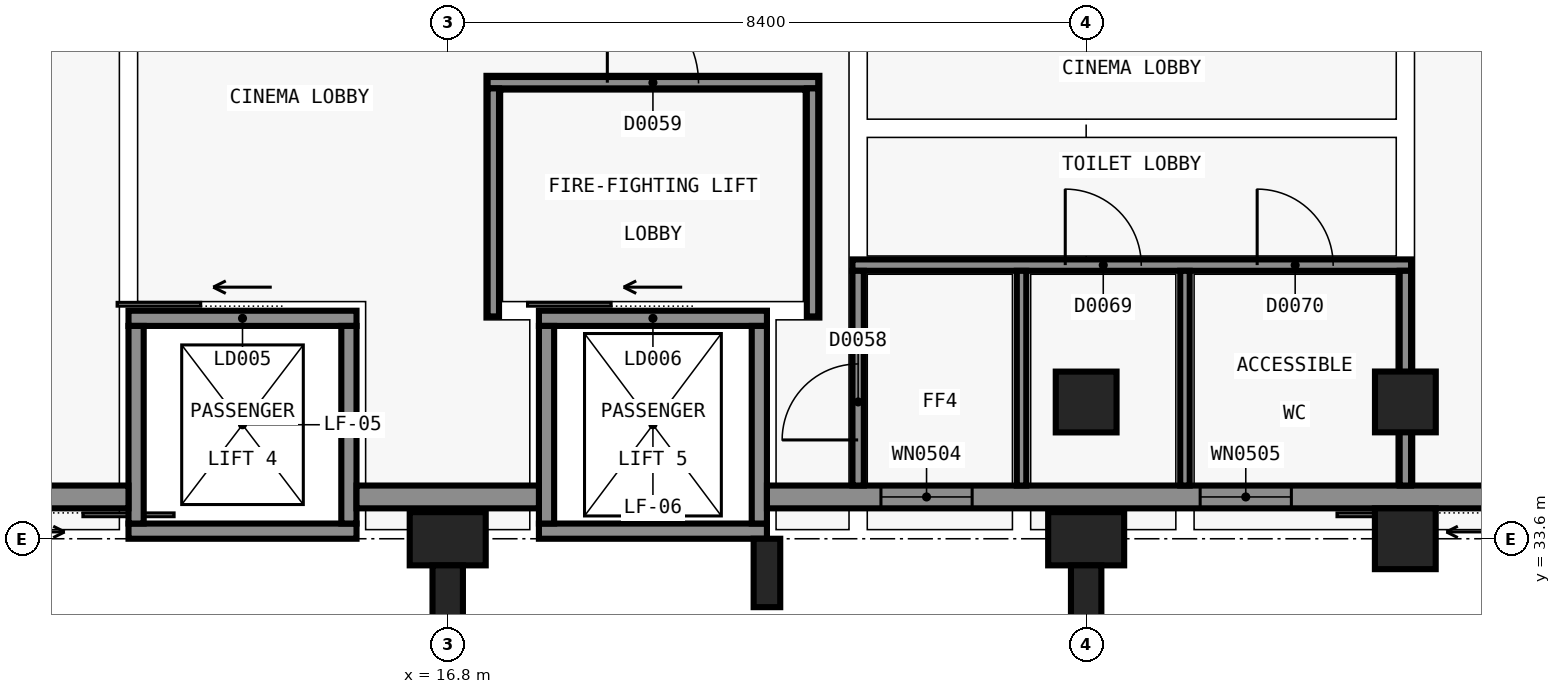
"""IFC4 building model, lengths in metres.
Left out: names, types, materials, properties, quantities, classifications, styles, units other than length and angle.
Written with IfcOpenShell. Run it as: python <this file> out.ifc"""

import sys

from ifc_helpers import new_model, si_unit, direction, frame, frame_2d, origin, origin_2d, place, context, subcontext, project, spatial, rectangle, extrude, element, fill, save


model = new_model("IFC4")
c1 = context("Model", 3, precision=1e-05, world=origin(), true_north=direction((0.0, 1.0)))
c2 = subcontext(c1, "Body", "Model", "MODEL_VIEW")
j1 = project(units=[si_unit("LENGTHUNIT", "METRE"), si_unit("PLANEANGLEUNIT", "RADIAN")], contexts=[c1])
p1 = place(None, origin())
s1 = spatial("IfcSite", under=j1, at=p1, CompositionType="ELEMENT")
p2 = place(p1, origin())
s2 = spatial("IfcBuilding", under=s1, at=p2, CompositionType="ELEMENT")
p3 = place(p2, origin())
s3 = spatial("IfcBuildingStorey", under=s2, at=p3, CompositionType="ELEMENT", Elevation=0.0)
p4 = place(p3, frame((15.6, 33.7, -1.6), z_axis=(0.0, 0.0, 1.0), x_axis=(-1.0, 0.0, 0.0)))
e1 = element("IfcWall", 1, at=p4, inside=s3, PredefinedType="SHEAR", context=c2, shape_type="SweptSolid", body=[
    extrude(rectangle(XDim=3.0, YDim=0.2, at=frame_2d((1.5, 0.0))), origin(), (0.0, 0.0, 1.0), 7.0),
])
p5 = place(p3, frame((12.6, 36.5, -1.6), z_axis=(0.0, 0.0, 1.0), x_axis=(1.0, 0.0, 0.0)))
e2 = element("IfcWall", 2, at=p5, inside=s3, PredefinedType="SHEAR", context=c2, shape_type="SweptSolid", body=[
    extrude(rectangle(XDim=3.0, YDim=0.2, at=frame_2d((1.5, 0.0))), origin(), (0.0, 0.0, 1.0), 7.0),
])
p6 = place(p5, frame((0.95, 0.0, 1.6)))
e3 = element("IfcOpeningElement", 3, at=p6, cuts=e2, PredefinedType="OPENING", context=c2, shape_type="SweptSolid", body=[
    extrude(rectangle(XDim=1.1, YDim=2.1, at=frame_2d((0.55, 1.05))), frame((0.0, 0.11, 0.0), z_axis=(0.0, -1.0, 0.0), x_axis=(1.0, 0.0, 0.0)), (0.0, 0.0, 1.0), 0.22),
])
for number, where, z_axis, x_axis in (
    (4, (12.7, 33.8, -1.6), (0.0, 0.0, 1.0), (0.0, 1.0, 0.0)),
    (5, (15.5, 36.4, -1.6), (0.0, 0.0, 1.0), (0.0, -1.0, 0.0)),
):
    element("IfcWall", number, at=place(p3, frame(where, z_axis=z_axis, x_axis=x_axis)), inside=s3, PredefinedType="SHEAR", context=c2, shape_type="SweptSolid", body=[
        extrude(rectangle(XDim=2.6, YDim=0.2, at=frame_2d((1.3, 0.0))), origin(), (0.0, 0.0, 1.0), 7.0),
    ])
p7 = place(p3, frame((21.0, 33.7, -1.6), z_axis=(0.0, 0.0, 1.0), x_axis=(-1.0, 0.0, 0.0)))
e6 = element("IfcWall", 6, at=p7, inside=s3, PredefinedType="SHEAR", context=c2, shape_type="SweptSolid", body=[
    extrude(rectangle(XDim=3.0, YDim=0.2, at=frame_2d((1.5, 0.0))), origin(), (0.0, 0.0, 1.0), 7.0),
])
p8 = place(p3, frame((18.0, 36.5, -1.6), z_axis=(0.0, 0.0, 1.0), x_axis=(1.0, 0.0, 0.0)))
e7 = element("IfcWall", 7, at=p8, inside=s3, PredefinedType="SHEAR", context=c2, shape_type="SweptSolid", body=[
    extrude(rectangle(XDim=3.0, YDim=0.2, at=frame_2d((1.5, 0.0))), origin(), (0.0, 0.0, 1.0), 7.0),
])
p9 = place(p8, frame((0.95, 0.0, 1.6)))
e8 = element("IfcOpeningElement", 8, at=p9, cuts=e7, PredefinedType="OPENING", context=c2, shape_type="SweptSolid", body=[
    extrude(rectangle(XDim=1.1, YDim=2.1, at=frame_2d((0.55, 1.05))), frame((0.0, 0.11, 0.0), z_axis=(0.0, -1.0, 0.0), x_axis=(1.0, 0.0, 0.0)), (0.0, 0.0, 1.0), 0.22),
])
for number, where, z_axis, x_axis in (
    (9, (18.1, 33.8, -1.6), (0.0, 0.0, 1.0), (0.0, 1.0, 0.0)),
    (10, (20.9, 36.4, -1.6), (0.0, 0.0, 1.0), (0.0, -1.0, 0.0)),
):
    element("IfcWall", number, at=place(p3, frame(where, z_axis=z_axis, x_axis=x_axis)), inside=s3, PredefinedType="SHEAR", context=c2, shape_type="SweptSolid", body=[
        extrude(rectangle(XDim=2.6, YDim=0.2, at=frame_2d((1.3, 0.0))), origin(), (0.0, 0.0, 1.0), 7.0),
    ])
for number, where, z_axis, x_axis in (
    (11, (16.8, 33.6, -0.3), (0.0, 0.0, 1.0), (1.0, 0.0, 0.0)),
    (12, (25.2, 33.6, -0.3), (0.0, 0.0, 1.0), (1.0, 0.0, 0.0)),
):
    element("IfcColumn", number, at=place(p3, frame(where, z_axis=z_axis, x_axis=x_axis)), inside=s3, PredefinedType="COLUMN", context=c2, shape_type="SweptSolid", body=[
        extrude(rectangle(XDim=1.0, YDim=0.7, at=origin_2d()), origin(), (0.0, 0.0, 1.0), 5.7),
    ])
for number, where, z_axis, x_axis in (
    (13, (25.2, 35.399, -0.3), (0.0, 0.0, 1.0), (1.0, 0.0, 0.0)),
    (14, (29.399, 33.6, -0.3), (0.0, 0.0, 1.0), (1.0, 0.0, 0.0)),
    (15, (29.4, 35.4, -0.3), (0.0, 0.0, 1.0), (1.0, 0.0, 0.0)),
):
    element("IfcColumn", number, at=place(p3, frame(where, z_axis=z_axis, x_axis=x_axis)), inside=s3, PredefinedType="COLUMN", context=c2, shape_type="SweptSolid", body=[
        extrude(rectangle(XDim=0.8, YDim=0.8, at=origin_2d()), origin(), (0.0, 0.0, 1.0), 5.7),
    ])
p10 = place(p3, frame((12.6, 34.15, 0.0), z_axis=(0.0, 0.0, 1.0), x_axis=(-1.0, 0.0, 0.0)))
e16 = element("IfcWall", 16, at=p10, inside=s3, PredefinedType="SOLIDWALL", context=c2, shape_type="SweptSolid", body=[
    extrude(rectangle(XDim=7.8, YDim=0.3, at=frame_2d((3.9, 0.0))), origin(), (0.0, 0.0, 1.0), 5.1),
])
p11 = place(p10, frame((0.6, 0.0, 0.0)))
e17 = element("IfcOpeningElement", 17, at=p11, cuts=e16, PredefinedType="OPENING", context=c2, shape_type="SweptSolid", body=[
    extrude(rectangle(XDim=2.4, YDim=2.4, at=frame_2d((1.2, 1.2))), frame((0.0, 0.16, 0.0), z_axis=(0.0, -1.0, 0.0), x_axis=(1.0, 0.0, 0.0)), (0.0, 0.0, 1.0), 0.32),
])
p12 = place(p10, frame((5.1, 0.0, 0.0)))
e18 = element("IfcOpeningElement", 18, at=p12, cuts=e16, PredefinedType="OPENING", context=c2, shape_type="SweptSolid", body=[
    extrude(rectangle(XDim=2.4, YDim=2.4, at=frame_2d((1.2, 1.2))), frame((0.0, 0.16, 0.0), z_axis=(0.0, -1.0, 0.0), x_axis=(1.0, 0.0, 0.0)), (0.0, 0.0, 1.0), 0.32),
])
p13 = place(p3, frame((18.0, 34.15, 0.0), z_axis=(0.0, 0.0, 1.0), x_axis=(-1.0, 0.0, 0.0)))
e19 = element("IfcWall", 19, at=p13, inside=s3, PredefinedType="SOLIDWALL", context=c2, shape_type="SweptSolid", body=[
    extrude(rectangle(XDim=2.4, YDim=0.3, at=frame_2d((1.2, 0.0))), origin(), (0.0, 0.0, 1.0), 5.1),
])
p14 = place(p3, frame((33.6, 34.15, 0.0), z_axis=(0.0, 0.0, 1.0), x_axis=(-1.0, 0.0, 0.0)))
e20 = element("IfcWall", 20, at=p14, inside=s3, PredefinedType="SOLIDWALL", context=c2, shape_type="SweptSolid", body=[
    extrude(rectangle(XDim=12.6, YDim=0.3, at=frame_2d((6.3, 0.0))), origin(), (0.0, 0.0, 1.0), 5.1),
])
p15 = place(p14, frame((1.5, 0.0, 0.0)))
e21 = element("IfcOpeningElement", 21, at=p15, cuts=e20, PredefinedType="OPENING", context=c2, shape_type="SweptSolid", body=[
    extrude(rectangle(XDim=2.4, YDim=2.4, at=frame_2d((1.2, 1.2))), frame((0.0, 0.16, 0.0), z_axis=(0.0, -1.0, 0.0), x_axis=(1.0, 0.0, 0.0)), (0.0, 0.0, 1.0), 0.32),
])
p16 = place(p14, frame((9.9, 0.0, 1.5)))
e22 = element("IfcOpeningElement", 22, at=p16, cuts=e20, PredefinedType="OPENING", context=c2, shape_type="SweptSolid", body=[
    extrude(rectangle(XDim=1.2, YDim=0.9, at=frame_2d((0.6, 0.45))), frame((0.0, 0.16, 0.0), z_axis=(0.0, -1.0, 0.0), x_axis=(1.0, 0.0, 0.0)), (0.0, 0.0, 1.0), 0.32),
])
p17 = place(p14, frame((5.7, 0.0, 1.5)))
e23 = element("IfcOpeningElement", 23, at=p17, cuts=e20, PredefinedType="OPENING", context=c2, shape_type="SweptSolid", body=[
    extrude(rectangle(XDim=1.2, YDim=0.9, at=frame_2d((0.6, 0.45))), frame((0.0, 0.16, 0.0), z_axis=(0.0, -1.0, 0.0), x_axis=(1.0, 0.0, 0.0)), (0.0, 0.0, 1.0), 0.32),
])
p18 = place(p3, frame((16.8, 32.65, -0.3), z_axis=(0.0, 0.0, 1.0), x_axis=(1.0, 0.0, 0.0)))
e24 = element("IfcColumn", 24, at=p18, inside=s3, PredefinedType="PILASTER", context=c2, shape_type="SweptSolid", body=[
    extrude(rectangle(XDim=0.4, YDim=1.2, at=origin_2d()), origin(), (0.0, 0.0, 1.0), 5.7),
])
p19 = place(p3, frame((21.0, 33.15, -0.3), z_axis=(0.0, 0.0, 1.0), x_axis=(1.0, 0.0, 0.0)))
e25 = element("IfcColumn", 25, at=p19, inside=s3, PredefinedType="PILASTER", context=c2, shape_type="SweptSolid", body=[
    extrude(rectangle(XDim=0.35, YDim=0.9, at=origin_2d()), origin(), (0.0, 0.0, 1.0), 5.7),
])
p20 = place(p3, frame((25.2, 32.65, -0.3), z_axis=(0.0, 0.0, 1.0), x_axis=(1.0, 0.0, 0.0)))
e26 = element("IfcColumn", 26, at=p20, inside=s3, PredefinedType="PILASTER", context=c2, shape_type="SweptSolid", body=[
    extrude(rectangle(XDim=0.4, YDim=1.2, at=origin_2d()), origin(), (0.0, 0.0, 1.0), 5.7),
])
p21 = place(p3, frame((22.125, 37.2, 0.0), z_axis=(0.0, 0.0, 1.0), x_axis=(1.0, 0.0, 0.0)))
e27 = element("IfcWall", 27, at=p21, inside=s3, PredefinedType="PARTITIONING", context=c2, shape_type="SweptSolid", body=[
    extrude(rectangle(XDim=7.35, YDim=0.15, at=frame_2d((3.675, 0.0))), origin(), (0.0, 0.0, 1.0), 4.4),
])
p22 = place(p21, frame((2.8, 0.0, 0.0)))
e28 = element("IfcOpeningElement", 28, at=p22, cuts=e27, PredefinedType="OPENING", context=c2, shape_type="SweptSolid", body=[
    extrude(rectangle(XDim=1.0, YDim=2.1, at=frame_2d((0.5, 1.05))), frame((0.0, 0.085, 0.0), z_axis=(0.0, -1.0, 0.0), x_axis=(1.0, 0.0, 0.0)), (0.0, 0.0, 1.0), 0.17),
])
p23 = place(p21, frame((5.325, 0.0, 0.0)))
e29 = element("IfcOpeningElement", 29, at=p23, cuts=e27, PredefinedType="OPENING", context=c2, shape_type="SweptSolid", body=[
    extrude(rectangle(XDim=1.0, YDim=2.1, at=frame_2d((0.5, 1.05))), frame((0.0, 0.085, 0.0), z_axis=(0.0, -1.0, 0.0), x_axis=(1.0, 0.0, 0.0)), (0.0, 0.0, 1.0), 0.17),
])
p24 = place(p3, frame((17.325, 39.6, 0.0), z_axis=(0.0, 0.0, 1.0), x_axis=(1.0, 0.0, 0.0)))
e30 = element("IfcWall", 30, at=p24, inside=s3, PredefinedType="SOLIDWALL", context=c2, shape_type="SweptSolid", body=[
    extrude(rectangle(XDim=4.35, YDim=0.15, at=frame_2d((2.175, 0.0))), origin(), (0.0, 0.0, 1.0), 4.4),
])
p25 = place(p24, frame((1.575, 0.0, 0.0)))
e31 = element("IfcOpeningElement", 31, at=p25, cuts=e30, PredefinedType="OPENING", context=c2, shape_type="SweptSolid", body=[
    extrude(rectangle(XDim=1.2, YDim=2.1, at=frame_2d((0.6, 1.05))), frame((0.0, 0.085, 0.0), z_axis=(0.0, -1.0, 0.0), x_axis=(1.0, 0.0, 0.0)), (0.0, 0.0, 1.0), 0.17),
])
p26 = place(p3, frame((22.2, 34.3, 0.0), z_axis=(0.0, 0.0, 1.0), x_axis=(0.0, 1.0, 0.0)))
e32 = element("IfcWall", 32, at=p26, inside=s3, PredefinedType="PARTITIONING", context=c2, shape_type="SweptSolid", body=[
    extrude(rectangle(XDim=2.825, YDim=0.15, at=frame_2d((1.413, 0.0))), origin(), (0.0, 0.0, 1.0), 5.1),
])
p27 = place(p26, frame((0.6, 0.0, 0.0)))
e33 = element("IfcOpeningElement", 33, at=p27, cuts=e32, PredefinedType="OPENING", context=c2, shape_type="SweptSolid", body=[
    extrude(rectangle(XDim=1.0, YDim=2.1, at=frame_2d((0.5, 1.05))), frame((0.0, 0.085, 0.0), z_axis=(0.0, -1.0, 0.0), x_axis=(1.0, 0.0, 0.0)), (0.0, 0.0, 1.0), 0.17),
])
p28 = place(p3, frame((29.4, 34.3, 0.0), z_axis=(0.0, 0.0, 1.0), x_axis=(0.0, 1.0, 0.0)))
e34 = element("IfcWall", 34, at=p28, inside=s3, PredefinedType="PARTITIONING", context=c2, shape_type="SweptSolid", body=[
    extrude(rectangle(XDim=2.825, YDim=0.15, at=frame_2d((1.413, 0.0))), origin(), (0.0, 0.0, 1.0), 5.1),
])
for number, where, z_axis, x_axis in (
    (35, (17.4, 36.525, 0.0), (0.0, 0.0, 1.0), (0.0, 1.0, 0.0)),
    (36, (21.6, 36.525, 0.0), (0.0, 0.0, 1.0), (0.0, 1.0, 0.0)),
):
    element("IfcWall", number, at=place(p3, frame(where, z_axis=z_axis, x_axis=x_axis)), inside=s3, PredefinedType="SOLIDWALL", context=c2, shape_type="SweptSolid", body=[
        extrude(rectangle(XDim=3.0, YDim=0.15, at=frame_2d((1.5, 0.0))), origin(), (0.0, 0.0, 1.0), 5.1),
    ])
for number, where, z_axis, x_axis in (
    (37, (24.35, 34.3, 0.0), (0.0, 0.0, 1.0), (0.0, 1.0, 0.0)),
    (38, (26.5, 34.3, 0.0), (0.0, 0.0, 1.0), (0.0, 1.0, 0.0)),
):
    element("IfcWall", number, at=place(p3, frame(where, z_axis=z_axis, x_axis=x_axis)), inside=s3, PredefinedType="PARTITIONING", context=c2, shape_type="SweptSolid", body=[
        extrude(rectangle(XDim=2.825, YDim=0.125, at=frame_2d((1.413, 0.0))), origin(), (0.0, 0.0, 1.0), 5.1),
    ])
p29 = place(p11, origin())
e39 = element("IfcDoor", 39, at=p29, inside=s3, OperationType="DOUBLE_DOOR_SLIDING", PredefinedType="DOOR", context=c2, shape_type="SweptSolid", body=[
    extrude(rectangle(XDim=2.4, YDim=2.4, at=frame_2d((1.2, 1.2))), frame((0.0, 0.025, 0.0), z_axis=(0.0, -1.0, 0.0), x_axis=(1.0, 0.0, 0.0)), (0.0, 0.0, 1.0), 0.05),
])
fill(e17, e39)
p30 = place(p15, origin())
e40 = element("IfcDoor", 40, at=p30, inside=s3, OperationType="DOUBLE_DOOR_SLIDING", PredefinedType="DOOR", context=c2, shape_type="SweptSolid", body=[
    extrude(rectangle(XDim=2.4, YDim=2.4, at=frame_2d((1.2, 1.2))), frame((0.0, 0.025, 0.0), z_axis=(0.0, -1.0, 0.0), x_axis=(1.0, 0.0, 0.0)), (0.0, 0.0, 1.0), 0.05),
])
fill(e21, e40)
p31 = place(p16, origin())
e41 = element("IfcWindow", 41, at=p31, inside=s3, PartitioningType="SINGLE_PANEL", PredefinedType="WINDOW", context=c2, shape_type="SweptSolid", body=[
    extrude(rectangle(XDim=1.2, YDim=0.9, at=frame_2d((0.6, 0.45))), frame((0.0, 0.03, 0.0), z_axis=(0.0, -1.0, 0.0), x_axis=(1.0, 0.0, 0.0)), (0.0, 0.0, 1.0), 0.06),
])
fill(e22, e41)
p32 = place(p17, origin())
e42 = element("IfcWindow", 42, at=p32, inside=s3, PartitioningType="SINGLE_PANEL", PredefinedType="WINDOW", context=c2, shape_type="SweptSolid", body=[
    extrude(rectangle(XDim=1.2, YDim=0.9, at=frame_2d((0.6, 0.45))), frame((0.0, 0.03, 0.0), z_axis=(0.0, -1.0, 0.0), x_axis=(1.0, 0.0, 0.0)), (0.0, 0.0, 1.0), 0.06),
])
fill(e23, e42)
p33 = place(p6, origin())
e43 = element("IfcDoor", 43, at=p33, inside=s3, OperationType="SLIDING_TO_LEFT", PredefinedType="DOOR", context=c2, shape_type="SweptSolid", body=[
    extrude(rectangle(XDim=1.1, YDim=2.1, at=frame_2d((0.55, 1.05))), frame((0.0, 0.025, 0.0), z_axis=(0.0, -1.0, 0.0), x_axis=(1.0, 0.0, 0.0)), (0.0, 0.0, 1.0), 0.05),
])
fill(e3, e43)
p34 = place(p9, origin())
e44 = element("IfcDoor", 44, at=p34, inside=s3, OperationType="SLIDING_TO_LEFT", PredefinedType="DOOR", context=c2, shape_type="SweptSolid", body=[
    extrude(rectangle(XDim=1.1, YDim=2.1, at=frame_2d((0.55, 1.05))), frame((0.0, 0.025, 0.0), z_axis=(0.0, -1.0, 0.0), x_axis=(1.0, 0.0, 0.0)), (0.0, 0.0, 1.0), 0.05),
])
fill(e8, e44)
p35 = place(p27, origin())
e45 = element("IfcDoor", 45, at=p35, inside=s3, OperationType="SINGLE_SWING_RIGHT", PredefinedType="DOOR", context=c2, shape_type="SweptSolid", body=[
    extrude(rectangle(XDim=1.0, YDim=2.1, at=frame_2d((0.5, 1.05))), frame((0.0, 0.025, 0.0), z_axis=(0.0, -1.0, 0.0), x_axis=(1.0, 0.0, 0.0)), (0.0, 0.0, 1.0), 0.05),
])
fill(e33, e45)
p36 = place(p25, origin())
e46 = element("IfcDoor", 46, at=p36, inside=s3, OperationType="SINGLE_SWING_RIGHT", PredefinedType="DOOR", context=c2, shape_type="SweptSolid", body=[
    extrude(rectangle(XDim=1.2, YDim=2.1, at=frame_2d((0.6, 1.05))), frame((0.0, 0.025, 0.0), z_axis=(0.0, -1.0, 0.0), x_axis=(1.0, 0.0, 0.0)), (0.0, 0.0, 1.0), 0.05),
])
fill(e31, e46)
p37 = place(p22, origin())
e47 = element("IfcDoor", 47, at=p37, inside=s3, OperationType="SINGLE_SWING_RIGHT", PredefinedType="DOOR", context=c2, shape_type="SweptSolid", body=[
    extrude(rectangle(XDim=1.0, YDim=2.1, at=frame_2d((0.5, 1.05))), frame((0.0, 0.025, 0.0), z_axis=(0.0, -1.0, 0.0), x_axis=(1.0, 0.0, 0.0)), (0.0, 0.0, 1.0), 0.05),
])
fill(e28, e47)
p38 = place(p23, origin())
e48 = element("IfcDoor", 48, at=p38, inside=s3, OperationType="SINGLE_SWING_RIGHT", PredefinedType="DOOR", context=c2, shape_type="SweptSolid", body=[
    extrude(rectangle(XDim=1.0, YDim=2.1, at=frame_2d((0.5, 1.05))), frame((0.0, 0.025, 0.0), z_axis=(0.0, -1.0, 0.0), x_axis=(1.0, 0.0, 0.0)), (0.0, 0.0, 1.0), 0.05),
])
fill(e29, e48)
save(model, sys.argv[1])
